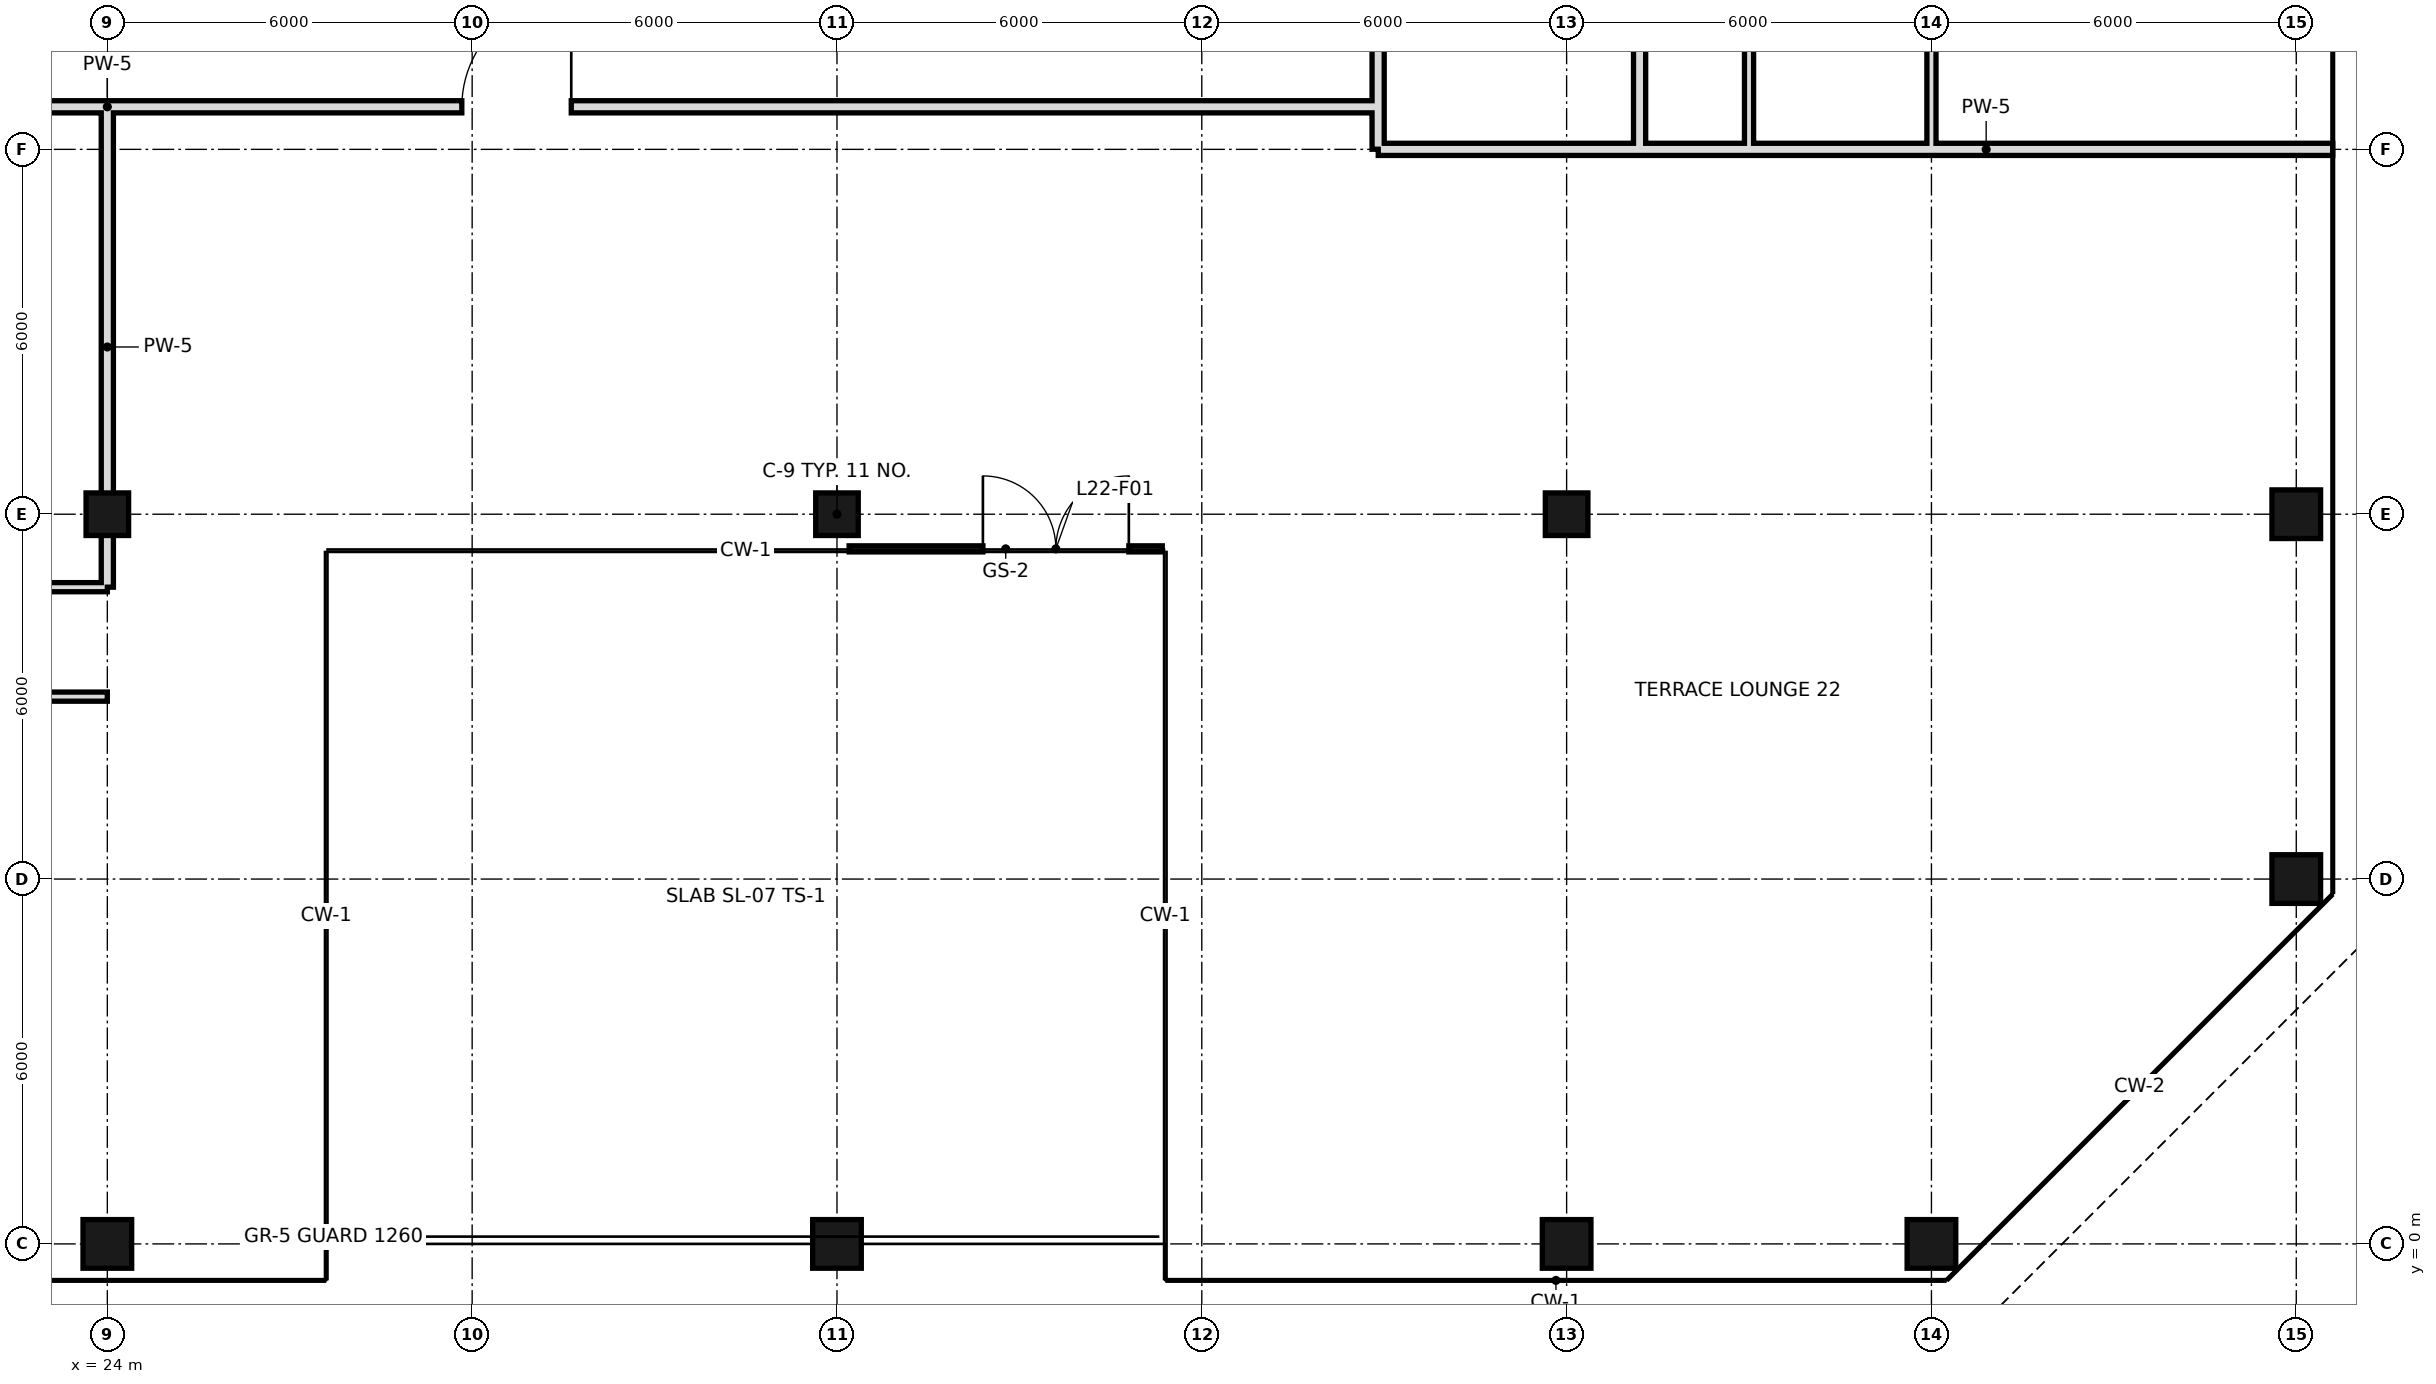
"""IFC4 building model, lengths in metres.
Left out: names, types, materials, properties, quantities, classifications, styles, units other than length and angle.
Written with IfcOpenShell. Run it as: python <this file> out.ifc"""

import sys

from ifc_helpers import new_model, si_unit, direction, frame, frame_2d, origin, origin_2d, place, context, subcontext, project, spatial, rectangle, hollow_rectangle, extrude, element, fill, save


model = new_model("IFC4")
c1 = context("Model", 3, precision=1e-05, world=origin(), true_north=direction((0.0, 1.0)))
c2 = subcontext(c1, "Body", "Model", "MODEL_VIEW")
j1 = project(units=[si_unit("LENGTHUNIT", "METRE"), si_unit("PLANEANGLEUNIT", "RADIAN")], contexts=[c1])
p1 = place(None, origin())
s1 = spatial("IfcSite", under=j1, at=p1, CompositionType="ELEMENT")
p2 = place(p1, origin())
s2 = spatial("IfcBuilding", under=s1, at=p2, CompositionType="ELEMENT")
p3 = place(p2, frame((0.0, 0.0, 103.4)))
s3 = spatial("IfcBuildingStorey", under=s2, at=p3, CompositionType="ELEMENT", Elevation=103.4)
p4 = place(p3, frame((24.0, 0.0, 0.0), z_axis=(0.0, 0.0, 1.0), x_axis=(1.0, 0.0, 0.0)))
e1 = element("IfcColumn", 1, at=p4, inside=s3, PredefinedType="COLUMN", context=c2, shape_type="SweptSolid", body=[
    extrude(hollow_rectangle(XDim=0.8, YDim=0.8, WallThickness=0.04, at=origin_2d()), origin(), (0.0, 0.0, 1.0), 3.6),
])
p5 = place(p3, frame((24.0, 12.0, 0.0), z_axis=(0.0, 0.0, 1.0), x_axis=(1.0, 0.0, 0.0)))
e2 = element("IfcColumn", 2, at=p5, inside=s3, PredefinedType="COLUMN", context=c2, shape_type="SweptSolid", body=[
    extrude(hollow_rectangle(XDim=0.7, YDim=0.7, WallThickness=0.036, at=origin_2d()), origin(), (0.0, 0.0, 1.0), 3.6),
])
p6 = place(p3, frame((36.0, 0.0, 0.0), z_axis=(0.0, 0.0, 1.0), x_axis=(1.0, 0.0, 0.0)))
e3 = element("IfcColumn", 3, at=p6, inside=s3, PredefinedType="COLUMN", context=c2, shape_type="SweptSolid", body=[
    extrude(hollow_rectangle(XDim=0.8, YDim=0.8, WallThickness=0.04, at=origin_2d()), origin(), (0.0, 0.0, 1.0), 3.6),
])
p7 = place(p3, frame((36.0, 12.0, 0.0), z_axis=(0.0, 0.0, 1.0), x_axis=(1.0, 0.0, 0.0)))
e4 = element("IfcColumn", 4, at=p7, inside=s3, PredefinedType="COLUMN", context=c2, shape_type="SweptSolid", body=[
    extrude(hollow_rectangle(XDim=0.7, YDim=0.7, WallThickness=0.036, at=origin_2d()), origin(), (0.0, 0.0, 1.0), 3.6),
])
p8 = place(p3, frame((48.0, 0.0, 0.0), z_axis=(0.0, 0.0, 1.0), x_axis=(1.0, 0.0, 0.0)))
e5 = element("IfcColumn", 5, at=p8, inside=s3, PredefinedType="COLUMN", context=c2, shape_type="SweptSolid", body=[
    extrude(hollow_rectangle(XDim=0.8, YDim=0.8, WallThickness=0.04, at=origin_2d()), origin(), (0.0, 0.0, 1.0), 3.6),
])
p9 = place(p3, frame((48.0, 12.0, 0.0), z_axis=(0.0, 0.0, 1.0), x_axis=(1.0, 0.0, 0.0)))
e6 = element("IfcColumn", 6, at=p9, inside=s3, PredefinedType="COLUMN", context=c2, shape_type="SweptSolid", body=[
    extrude(hollow_rectangle(XDim=0.7, YDim=0.7, WallThickness=0.036, at=origin_2d()), origin(), (0.0, 0.0, 1.0), 3.6),
])
for number, where, z_axis, x_axis in (
    (7, (54.0, 0.0, 0.0), (0.0, 0.0, 1.0), (1.0, 0.0, 0.0)),
    (8, (60.0, 6.0, 0.0), (0.0, 0.0, 1.0), (1.0, 0.0, 0.0)),
    (9, (60.0, 12.0, 0.0), (0.0, 0.0, 1.0), (1.0, 0.0, 0.0)),
):
    element("IfcColumn", number, at=place(p3, frame(where, z_axis=z_axis, x_axis=x_axis)), inside=s3, PredefinedType="COLUMN", context=c2, shape_type="SweptSolid", body=[
        extrude(hollow_rectangle(XDim=0.8, YDim=0.8, WallThickness=0.04, at=origin_2d()), origin(), (0.0, 0.0, 1.0), 3.6),
    ])
p10 = place(p3, frame((36.2, 11.43, 0.0), z_axis=(0.0, 0.0, 1.0), x_axis=(1.0, 0.0, 0.0)))
e10 = element("IfcWall", 10, at=p10, inside=s3, PredefinedType="SOLIDWALL", context=c2, shape_type="SweptSolid", body=[
    extrude(rectangle(XDim=5.15, YDim=0.1, at=frame_2d((2.575, 0.0))), origin(), (0.0, 0.0, 1.0), 3.42),
])
p11 = place(p10, frame((2.2, 0.0, 0.0)))
e11 = element("IfcOpeningElement", 11, at=p11, cuts=e10, PredefinedType="OPENING", context=c2, shape_type="SweptSolid", body=[
    extrude(rectangle(XDim=2.4, YDim=2.4, at=frame_2d((1.2, 1.2))), frame((0.0, 0.06, 0.0), z_axis=(0.0, -1.0, 0.0), x_axis=(1.0, 0.0, 0.0)), (0.0, 0.0, 1.0), 0.12),
])
p12 = place(p3, frame((24.0, 10.8, 0.0), z_axis=(0.0, 0.0, 1.0), x_axis=(0.0, 1.0, 0.0)))
e12 = element("IfcWall", 12, at=p12, inside=s3, PredefinedType="SOLIDWALL", context=c2, shape_type="SweptSolid", body=[
    extrude(rectangle(XDim=7.9, YDim=0.2, at=frame_2d((3.95, 0.0))), origin(), (0.0, 0.0, 1.0), 2.72),
])
p13 = place(p3, frame((44.9, 18.002, 0.0), z_axis=(0.0, 0.0, 1.0), x_axis=(0.0, 1.0, 0.0)))
e13 = element("IfcWall", 13, at=p13, inside=s3, PredefinedType="SOLIDWALL", context=c2, shape_type="SweptSolid", body=[
    extrude(rectangle(XDim=4.198, YDim=0.2, at=frame_2d((2.099, 0.0))), origin(), (0.0, 0.0, 1.0), 3.42),
])
p14 = place(p3, frame((49.2, 18.0, 0.0), z_axis=(0.0, 0.0, 1.0), x_axis=(0.0, 1.0, 0.0)))
e14 = element("IfcWall", 14, at=p14, inside=s3, PredefinedType="SOLIDWALL", context=c2, shape_type="SweptSolid", body=[
    extrude(rectangle(XDim=4.2, YDim=0.2, at=frame_2d((2.1, 0.0))), origin(), (0.0, 0.0, 1.0), 2.72),
])
p15 = place(p14, frame((2.14, 0.0, 0.0)))
e15 = element("IfcOpeningElement", 15, at=p15, cuts=e14, PredefinedType="OPENING", context=c2, shape_type="SweptSolid", body=[
    extrude(rectangle(XDim=1.0, YDim=2.4, at=frame_2d((0.5, 1.2))), frame((0.0, 0.11, 0.0), z_axis=(0.0, -1.0, 0.0), x_axis=(1.0, 0.0, 0.0)), (0.0, 0.0, 1.0), 0.22),
])
p16 = place(p3, frame((51.0, 18.0, 0.0), z_axis=(0.0, 0.0, 1.0), x_axis=(0.0, 1.0, 0.0)))
e16 = element("IfcWall", 16, at=p16, inside=s3, PredefinedType="PARTITIONING", context=c2, shape_type="SweptSolid", body=[
    extrude(rectangle(XDim=21.6, YDim=0.15, at=frame_2d((10.8, 0.0))), origin(), (0.0, 0.0, 1.0), 3.42),
])
p17 = place(p16, frame((7.04, 0.0, 0.0)))
e17 = element("IfcOpeningElement", 17, at=p17, cuts=e16, PredefinedType="OPENING", context=c2, shape_type="SweptSolid", body=[
    extrude(rectangle(XDim=1.8, YDim=2.4, at=frame_2d((0.9, 1.2))), frame((0.0, 0.085, 0.0), z_axis=(0.0, -1.0, 0.0), x_axis=(1.0, 0.0, 0.0)), (0.0, 0.0, 1.0), 0.17),
])
p18 = place(p16, frame((15.4, 0.0, 0.0)))
e18 = element("IfcOpeningElement", 18, at=p18, cuts=e16, PredefinedType="OPENING", context=c2, shape_type="SweptSolid", body=[
    extrude(rectangle(XDim=1.0, YDim=2.4, at=frame_2d((0.5, 1.2))), frame((0.0, 0.085, 0.0), z_axis=(0.0, -1.0, 0.0), x_axis=(1.0, 0.0, 0.0)), (0.0, 0.0, 1.0), 0.17),
])
p19 = place(p16, frame((19.3, 0.0, 0.0)))
e19 = element("IfcOpeningElement", 19, at=p19, cuts=e16, PredefinedType="OPENING", context=c2, shape_type="SweptSolid", body=[
    extrude(rectangle(XDim=1.0, YDim=2.4, at=frame_2d((0.5, 1.2))), frame((0.0, 0.085, 0.0), z_axis=(0.0, -1.0, 0.0), x_axis=(1.0, 0.0, 0.0)), (0.0, 0.0, 1.0), 0.17),
])
p20 = place(p3, frame((54.0, 18.0, 0.0), z_axis=(0.0, 0.0, 1.0), x_axis=(0.0, 1.0, 0.0)))
e20 = element("IfcWall", 20, at=p20, inside=s3, PredefinedType="PARTITIONING", context=c2, shape_type="SweptSolid", body=[
    extrude(rectangle(XDim=12.0, YDim=0.15, at=frame_2d((6.0, 0.0))), origin(), (0.0, 0.0, 1.0), 3.42),
])
p21 = place(p20, frame((7.04, 0.0, 0.0)))
e21 = element("IfcOpeningElement", 21, at=p21, cuts=e20, PredefinedType="OPENING", context=c2, shape_type="SweptSolid", body=[
    extrude(rectangle(XDim=1.8, YDim=2.4, at=frame_2d((0.9, 1.2))), frame((0.0, 0.085, 0.0), z_axis=(0.0, -1.0, 0.0), x_axis=(1.0, 0.0, 0.0)), (0.0, 0.0, 1.0), 0.17),
])
p22 = place(p3, frame((0.0, 10.8, 0.0), z_axis=(0.0, 0.0, 1.0), x_axis=(1.0, 0.0, 0.0)))
e22 = element("IfcWall", 22, at=p22, inside=s3, PredefinedType="PARTITIONING", context=c2, shape_type="SweptSolid", body=[
    extrude(rectangle(XDim=24.0, YDim=0.15, at=frame_2d((12.0, 0.0))), origin(), (0.0, 0.0, 1.0), 3.42),
])
p23 = place(p22, frame((21.28, 0.0, 0.0)))
e23 = element("IfcOpeningElement", 23, at=p23, cuts=e22, PredefinedType="OPENING", context=c2, shape_type="SweptSolid", body=[
    extrude(rectangle(XDim=1.0, YDim=2.4, at=frame_2d((0.5, 1.2))), frame((0.0, 0.085, 0.0), z_axis=(0.0, -1.0, 0.0), x_axis=(1.0, 0.0, 0.0)), (0.0, 0.0, 1.0), 0.17),
])
p24 = place(p22, frame((4.6, 0.0, 0.0)))
e24 = element("IfcOpeningElement", 24, at=p24, cuts=e22, PredefinedType="OPENING", context=c2, shape_type="SweptSolid", body=[
    extrude(rectangle(XDim=1.0, YDim=2.4, at=frame_2d((0.5, 1.2))), frame((0.0, 0.085, 0.0), z_axis=(0.0, -1.0, 0.0), x_axis=(1.0, 0.0, 0.0)), (0.0, 0.0, 1.0), 0.17),
])
p25 = place(p22, frame((13.06, 0.0, 0.0)))
e25 = element("IfcOpeningElement", 25, at=p25, cuts=e22, PredefinedType="OPENING", context=c2, shape_type="SweptSolid", body=[
    extrude(rectangle(XDim=1.0, YDim=2.4, at=frame_2d((0.5, 1.2))), frame((0.0, 0.085, 0.0), z_axis=(0.0, -1.0, 0.0), x_axis=(1.0, 0.0, 0.0)), (0.0, 0.0, 1.0), 0.17),
])
p26 = place(p3, frame((49.2, 18.0, 0.0), z_axis=(0.0, 0.0, 1.0), x_axis=(1.0, 0.0, 0.0)))
e26 = element("IfcWall", 26, at=p26, inside=s3, PredefinedType="SOLIDWALL", context=c2, shape_type="SweptSolid", body=[
    extrude(rectangle(XDim=11.4, YDim=0.2, at=frame_2d((5.7, 0.0))), origin(), (0.0, 0.0, 1.0), 2.72),
])
p27 = place(p3, frame((44.902, 18.0, 0.0), z_axis=(0.0, 0.0, 1.0), x_axis=(1.0, 0.0, 0.0)))
e27 = element("IfcWall", 27, at=p27, inside=s3, PredefinedType="SOLIDWALL", context=c2, shape_type="SweptSolid", body=[
    extrude(rectangle(XDim=4.298, YDim=0.2, at=frame_2d((2.149, 0.0))), origin(), (0.0, 0.0, 1.0), 2.72),
])
p28 = place(p3, frame((3.1, 18.7, 0.0), z_axis=(0.0, 0.0, 1.0), x_axis=(1.0, 0.0, 0.0)))
e28 = element("IfcWall", 28, at=p28, inside=s3, PredefinedType="SOLIDWALL", context=c2, shape_type="SweptSolid", body=[
    extrude(rectangle(XDim=41.8, YDim=0.2, at=frame_2d((20.9, 0.0))), origin(), (0.0, 0.0, 1.0), 2.72),
])
p29 = place(p28, frame((18.12, 0.0, 0.0)))
e29 = element("IfcOpeningElement", 29, at=p29, cuts=e28, PredefinedType="OPENING", context=c2, shape_type="SweptSolid", body=[
    extrude(rectangle(XDim=1.2, YDim=2.4, at=frame_2d((0.6, 1.2))), frame((0.0, 0.11, 0.0), z_axis=(0.0, -1.0, 0.0), x_axis=(1.0, 0.0, 0.0)), (0.0, 0.0, 1.0), 0.22),
])
p30 = place(p28, frame((26.73, 0.0, 0.0)))
e30 = element("IfcOpeningElement", 30, at=p30, cuts=e28, PredefinedType="OPENING", context=c2, shape_type="SweptSolid", body=[
    extrude(rectangle(XDim=1.8, YDim=2.4, at=frame_2d((0.9, 1.2))), frame((0.0, 0.11, 0.0), z_axis=(0.0, -1.0, 0.0), x_axis=(1.0, 0.0, 0.0)), (0.0, 0.0, 1.0), 0.22),
])
p31 = place(p3, frame((15.0, 9.0, 0.0), z_axis=(0.0, 0.0, 1.0), x_axis=(1.0, 0.0, 0.0)))
e31 = element("IfcWall", 31, at=p31, inside=s3, PredefinedType="PARTITIONING", context=c2, shape_type="SweptSolid", body=[
    extrude(rectangle(XDim=9.0, YDim=0.15, at=frame_2d((4.5, 0.0))), origin(), (0.0, 0.0, 1.0), 3.42),
])
p32 = place(p31, frame((0.7, 0.0, 0.0)))
e32 = element("IfcOpeningElement", 32, at=p32, cuts=e31, PredefinedType="OPENING", context=c2, shape_type="SweptSolid", body=[
    extrude(rectangle(XDim=1.0, YDim=2.4, at=frame_2d((0.5, 1.2))), frame((0.0, 0.085, 0.0), z_axis=(0.0, -1.0, 0.0), x_axis=(1.0, 0.0, 0.0)), (0.0, 0.0, 1.0), 0.17),
])
p33 = place(p31, frame((6.4, 0.0, 0.0)))
e33 = element("IfcOpeningElement", 33, at=p33, cuts=e31, PredefinedType="OPENING", context=c2, shape_type="SweptSolid", body=[
    extrude(rectangle(XDim=1.0, YDim=2.4, at=frame_2d((0.5, 1.2))), frame((0.0, 0.085, 0.0), z_axis=(0.0, -1.0, 0.0), x_axis=(1.0, 0.0, 0.0)), (0.0, 0.0, 1.0), 0.17),
])
p34 = place(p11, origin())
e34 = element("IfcDoor", 34, at=p34, inside=s3, OperationType="DOUBLE_DOOR_SINGLE_SWING", PredefinedType="DOOR", context=c2, shape_type="SweptSolid", body=[
    extrude(rectangle(XDim=2.4, YDim=2.4, at=frame_2d((1.2, 1.2))), frame((0.0, 0.025, 0.0), z_axis=(0.0, -1.0, 0.0), x_axis=(1.0, 0.0, 0.0)), (0.0, 0.0, 1.0), 0.05),
])
fill(e11, e34)
p35 = place(p30, frame((1.8, 0.0, 0.0), z_axis=(0.0, 0.0, 1.0), x_axis=(-1.0, 0.0, 0.0)))
e35 = element("IfcDoor", 35, at=p35, inside=s3, OperationType="SINGLE_SWING_LEFT", PredefinedType="DOOR", context=c2, shape_type="SweptSolid", body=[
    extrude(rectangle(XDim=1.8, YDim=2.4, at=frame_2d((0.9, 1.2))), frame((0.0, 0.025, 0.0), z_axis=(0.0, -1.0, 0.0), x_axis=(1.0, 0.0, 0.0)), (0.0, 0.0, 1.0), 0.05),
])
fill(e30, e35)
save(model, sys.argv[1])
